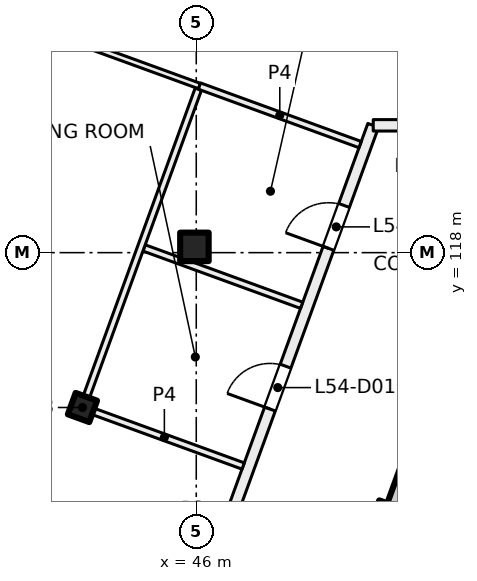
"""IFC4 building model, lengths in metres.
Left out: names, types, materials, properties, quantities, classifications, styles, units other than length and angle.
Written with IfcOpenShell. Run it as: python <this file> out.ifc"""

import sys

from ifc_helpers import new_model, si_unit, direction, frame, frame_2d, origin, origin_2d, place, context, subcontext, project, spatial, rectangle, extrude, element, fill, save


model = new_model("IFC4")
c1 = context("Model", 3, precision=1e-05, world=origin(), true_north=direction((0.0, 1.0)))
c2 = subcontext(c1, "Body", "Model", "MODEL_VIEW")
j1 = project(units=[si_unit("LENGTHUNIT", "METRE"), si_unit("PLANEANGLEUNIT", "RADIAN")], contexts=[c1])
p1 = place(None, origin())
s1 = spatial("IfcSite", under=j1, at=p1, CompositionType="ELEMENT")
p2 = place(p1, origin())
s2 = spatial("IfcBuilding", under=s1, at=p2, CompositionType="ELEMENT")
p3 = place(p2, frame((0.0, 0.0, 228.0)))
s3 = spatial("IfcBuildingStorey", under=s2, at=p3, CompositionType="ELEMENT", Elevation=228.0)
p4 = place(p3, frame((45.952, 118.152, 0.0), z_axis=(0.0, 0.0, 1.0), x_axis=(1.0, 0.0, 0.0)))
e1 = element("IfcColumn", 1, at=p4, inside=s3, PredefinedType="COLUMN", context=c2, shape_type="SweptSolid", body=[
    extrude(rectangle(XDim=0.75, YDim=0.75, at=origin_2d()), origin(), (0.0, 0.0, 1.0), 4.0),
])
p5 = place(p3, frame((43.006, 113.925, 0.0), z_axis=(0.0, 0.0, 1.0), x_axis=(-0.342020143326, -0.939692620786, 0.0)))
e2 = element("IfcColumn", 2, at=p5, inside=s3, PredefinedType="COLUMN", context=c2, shape_type="SweptSolid", body=[
    extrude(rectangle(XDim=0.6, YDim=0.6, at=origin_2d()), origin(), (0.0, 0.0, 1.0), 4.0),
])
p6 = place(p3, frame((51.04, 111.001, 0.0), z_axis=(0.0, 0.0, 1.0), x_axis=(-0.342020143326, -0.939692620786, 0.0)))
e3 = element("IfcColumn", 3, at=p6, inside=s3, PredefinedType="COLUMN", context=c2, shape_type="SweptSolid", body=[
    extrude(rectangle(XDim=0.75, YDim=0.75, at=origin_2d()), origin(), (0.0, 0.0, 1.0), 4.0),
])
p7 = place(p3, frame((52.212, 113.783, 0.0), z_axis=(0.0, 0.0, 1.0), x_axis=(-0.34202521188, -0.939690775968, 0.0)))
e4 = element("IfcWall", 4, at=p7, inside=s3, PredefinedType="SOLIDWALL", context=c2, shape_type="SweptSolid", body=[
    extrude(rectangle(XDim=21.745, YDim=0.6, at=frame_2d((10.873, 0.0))), origin(), (0.0, 0.0, 1.0), 3.625),
])
p8 = place(p7, frame((4.365, 0.0, 0.0)))
e5 = element("IfcOpeningElement", 5, at=p8, cuts=e4, PredefinedType="OPENING", context=c2, shape_type="SweptSolid", body=[
    extrude(rectangle(XDim=1.8, YDim=2.4, at=frame_2d((0.9, 1.2))), frame((0.0, 0.31, 0.0), z_axis=(0.0, -1.0, 0.0), x_axis=(1.0, 0.0, 0.0)), (0.0, 0.0, 1.0), 0.62),
])
p9 = place(p7, frame((8.265, 0.0, 0.9)))
e6 = element("IfcOpeningElement", 6, at=p9, cuts=e4, PredefinedType="OPENING", context=c2, shape_type="SweptSolid", body=[
    extrude(rectangle(XDim=3.0, YDim=2.4, at=frame_2d((1.5, 1.2))), frame((0.0, 0.31, 0.0), z_axis=(0.0, -1.0, 0.0), x_axis=(1.0, 0.0, 0.0)), (0.0, 0.0, 1.0), 0.62),
])
p10 = place(p7, frame((12.765, 0.0, 0.9)))
e7 = element("IfcOpeningElement", 7, at=p10, cuts=e4, PredefinedType="OPENING", context=c2, shape_type="SweptSolid", body=[
    extrude(rectangle(XDim=3.0, YDim=2.4, at=frame_2d((1.5, 1.2))), frame((0.0, 0.31, 0.0), z_axis=(0.0, -1.0, 0.0), x_axis=(1.0, 0.0, 0.0)), (0.0, 0.0, 1.0), 0.62),
])
p11 = place(p7, frame((17.265, 0.0, 0.9)))
e8 = element("IfcOpeningElement", 8, at=p11, cuts=e4, PredefinedType="OPENING", context=c2, shape_type="SweptSolid", body=[
    extrude(rectangle(XDim=3.0, YDim=2.4, at=frame_2d((1.5, 1.2))), frame((0.0, 0.31, 0.0), z_axis=(0.0, -1.0, 0.0), x_axis=(1.0, 0.0, 0.0)), (0.0, 0.0, 1.0), 0.62),
])
p12 = place(p3, frame((34.431, 126.624, 0.0), z_axis=(0.0, 0.0, 1.0), x_axis=(0.939703144457, -0.341991228392, 0.0)))
e9 = element("IfcWall", 9, at=p12, inside=s3, PredefinedType="PARTITIONING", context=c2, shape_type="SweptSolid", body=[
    extrude(rectangle(XDim=12.401, YDim=0.15, at=frame_2d((6.2, 0.0))), origin(), (0.0, 0.0, 1.0), 3.625),
])
p13 = place(p3, frame((42.732, 99.579, 0.0), z_axis=(0.0, 0.0, 1.0), x_axis=(0.342053589012, 0.939680446877, 0.0)))
e10 = element("IfcWall", 10, at=p13, inside=s3, PredefinedType="PARTITIONING", context=c2, shape_type="SweptSolid", body=[
    extrude(rectangle(XDim=23.166, YDim=0.3, at=frame_2d((11.583, 0.0))), origin(), (0.0, 0.0, 1.0), 3.625),
])
p14 = place(p13, frame((15.225, 0.0, 0.0)))
e11 = element("IfcOpeningElement", 11, at=p14, cuts=e10, PredefinedType="OPENING", context=c2, shape_type="SweptSolid", body=[
    extrude(rectangle(XDim=1.2, YDim=2.1, at=frame_2d((0.6, 1.05))), frame((0.0, 0.16, 0.0), z_axis=(0.0, -1.0, 0.0), x_axis=(1.0, 0.0, 0.0)), (0.0, 0.0, 1.0), 0.32),
])
p15 = place(p13, frame((19.725, 0.0, 0.0)))
e12 = element("IfcOpeningElement", 12, at=p15, cuts=e10, PredefinedType="OPENING", context=c2, shape_type="SweptSolid", body=[
    extrude(rectangle(XDim=1.2, YDim=2.1, at=frame_2d((0.6, 1.05))), frame((0.0, 0.16, 0.0), z_axis=(0.0, -1.0, 0.0), x_axis=(1.0, 0.0, 0.0)), (0.0, 0.0, 1.0), 0.32),
])
p16 = place(p13, frame((5.925, 0.0, 0.0)))
e13 = element("IfcOpeningElement", 13, at=p16, cuts=e10, PredefinedType="OPENING", context=c2, shape_type="SweptSolid", body=[
    extrude(rectangle(XDim=1.8, YDim=2.1, at=frame_2d((0.9, 1.05))), frame((0.0, 0.16, 0.0), z_axis=(0.0, -1.0, 0.0), x_axis=(1.0, 0.0, 0.0)), (0.0, 0.0, 1.0), 0.32),
])
for number, where, z_axis, x_axis in (
    (14, (43.088, 113.895, 0.0), (0.0, 0.0, 1.0), (0.94, -0.342, 0.0)),
    (15, (44.627, 118.124, 0.0), (0.0, 0.0, 1.0), (0.94, -0.342, 0.0)),
):
    element("IfcWall", number, at=place(p3, frame(where, z_axis=z_axis, x_axis=x_axis)), inside=s3, PredefinedType="PARTITIONING", context=c2, shape_type="SweptSolid", body=[
        extrude(rectangle(XDim=4.412, YDim=0.175, at=frame_2d((2.206, 0.0))), origin(), (0.0, 0.0, 1.0), 3.625),
    ])
p17 = place(p3, frame((46.054, 122.301, 0.0), z_axis=(0.0, 0.0, 1.0), x_axis=(-0.341963022424, -0.939713409128, 0.0)))
e16 = element("IfcWall", 16, at=p17, inside=s3, PredefinedType="PARTITIONING", context=c2, shape_type="SweptSolid", body=[
    extrude(rectangle(XDim=9.001, YDim=0.175, at=frame_2d((4.5, 0.0))), origin(), (0.0, 0.0, 1.0), 3.625),
])
p18 = place(p3, frame((50.312, 120.843, 0.0), z_axis=(0.0, 0.0, 1.0), x_axis=(-0.939609529273, 0.342248349154, 0.0)))
e17 = element("IfcWall", 17, at=p18, inside=s3, PredefinedType="PARTITIONING", context=c2, shape_type="SweptSolid", body=[
    extrude(rectangle(XDim=4.5, YDim=0.175, at=frame_2d((2.25, 0.0))), origin(), (0.0, 0.0, 1.0), 3.625),
])
p19 = place(p3, frame((50.657, 121.35, 0.0), z_axis=(0.0, 0.0, 1.0), x_axis=(1.0, 0.0, 0.0)))
e18 = element("IfcWall", 18, at=p19, inside=s3, PredefinedType="PARTITIONING", context=c2, shape_type="SweptSolid", body=[
    extrude(rectangle(XDim=35.096, YDim=0.3, at=frame_2d((17.548, 0.0))), origin(), (0.0, 0.0, 1.0), 3.625),
])
p20 = place(p19, frame((27.093, 0.0, 0.0)))
e19 = element("IfcOpeningElement", 19, at=p20, cuts=e18, PredefinedType="OPENING", context=c2, shape_type="SweptSolid", body=[
    extrude(rectangle(XDim=1.0, YDim=2.1, at=frame_2d((0.5, 1.05))), frame((0.0, 0.16, 0.0), z_axis=(0.0, -1.0, 0.0), x_axis=(1.0, 0.0, 0.0)), (0.0, 0.0, 1.0), 0.32),
])
p21 = place(p19, frame((23.243, 0.0, 0.0)))
e20 = element("IfcOpeningElement", 20, at=p21, cuts=e18, PredefinedType="OPENING", context=c2, shape_type="SweptSolid", body=[
    extrude(rectangle(XDim=1.2, YDim=2.1, at=frame_2d((0.6, 1.05))), frame((0.0, 0.16, 0.0), z_axis=(0.0, -1.0, 0.0), x_axis=(1.0, 0.0, 0.0)), (0.0, 0.0, 1.0), 0.32),
])
p22 = place(p19, frame((31.943, 0.0, 0.0)))
e21 = element("IfcOpeningElement", 21, at=p22, cuts=e18, PredefinedType="OPENING", context=c2, shape_type="SweptSolid", body=[
    extrude(rectangle(XDim=1.8, YDim=2.1, at=frame_2d((0.9, 1.05))), frame((0.0, 0.16, 0.0), z_axis=(0.0, -1.0, 0.0), x_axis=(1.0, 0.0, 0.0)), (0.0, 0.0, 1.0), 0.32),
])
p23 = place(p19, frame((16.593, 0.0, 0.0)))
e22 = element("IfcOpeningElement", 22, at=p23, cuts=e18, PredefinedType="OPENING", context=c2, shape_type="SweptSolid", body=[
    extrude(rectangle(XDim=1.0, YDim=2.1, at=frame_2d((0.5, 1.05))), frame((0.0, 0.16, 0.0), z_axis=(0.0, -1.0, 0.0), x_axis=(1.0, 0.0, 0.0)), (0.0, 0.0, 1.0), 0.32),
])
p24 = place(p19, frame((7.193, 0.0, 0.0)))
e23 = element("IfcOpeningElement", 23, at=p24, cuts=e18, PredefinedType="OPENING", context=c2, shape_type="SweptSolid", body=[
    extrude(rectangle(XDim=1.8, YDim=2.1, at=frame_2d((0.9, 1.05))), frame((0.0, 0.16, 0.0), z_axis=(0.0, -1.0, 0.0), x_axis=(1.0, 0.0, 0.0)), (0.0, 0.0, 1.0), 0.32),
])
p25 = place(p19, frame((0.896, 0.0, 0.0)))
e24 = element("IfcOpeningElement", 24, at=p25, cuts=e18, PredefinedType="OPENING", context=c2, shape_type="SweptSolid", body=[
    extrude(rectangle(XDim=1.8, YDim=2.1, at=frame_2d((0.9, 1.05))), frame((0.0, 0.16, 0.0), z_axis=(0.0, -1.0, 0.0), x_axis=(1.0, 0.0, 0.0)), (0.0, 0.0, 1.0), 0.32),
])
p26 = place(p14, origin())
e25 = element("IfcDoor", 25, at=p26, inside=s3, OperationType="DOUBLE_DOOR_SINGLE_SWING", PredefinedType="DOOR", context=c2, shape_type="SweptSolid", body=[
    extrude(rectangle(XDim=1.2, YDim=2.1, at=frame_2d((0.6, 1.05))), frame((0.0, 0.025, 0.0), z_axis=(0.0, -1.0, 0.0), x_axis=(1.0, 0.0, 0.0)), (0.0, 0.0, 1.0), 0.05),
])
fill(e11, e25)
p27 = place(p15, origin())
e26 = element("IfcDoor", 26, at=p27, inside=s3, OperationType="DOUBLE_DOOR_SINGLE_SWING", PredefinedType="DOOR", context=c2, shape_type="SweptSolid", body=[
    extrude(rectangle(XDim=1.2, YDim=2.1, at=frame_2d((0.6, 1.05))), frame((0.0, 0.025, 0.0), z_axis=(0.0, -1.0, 0.0), x_axis=(1.0, 0.0, 0.0)), (0.0, 0.0, 1.0), 0.05),
])
fill(e12, e26)
save(model, sys.argv[1])
